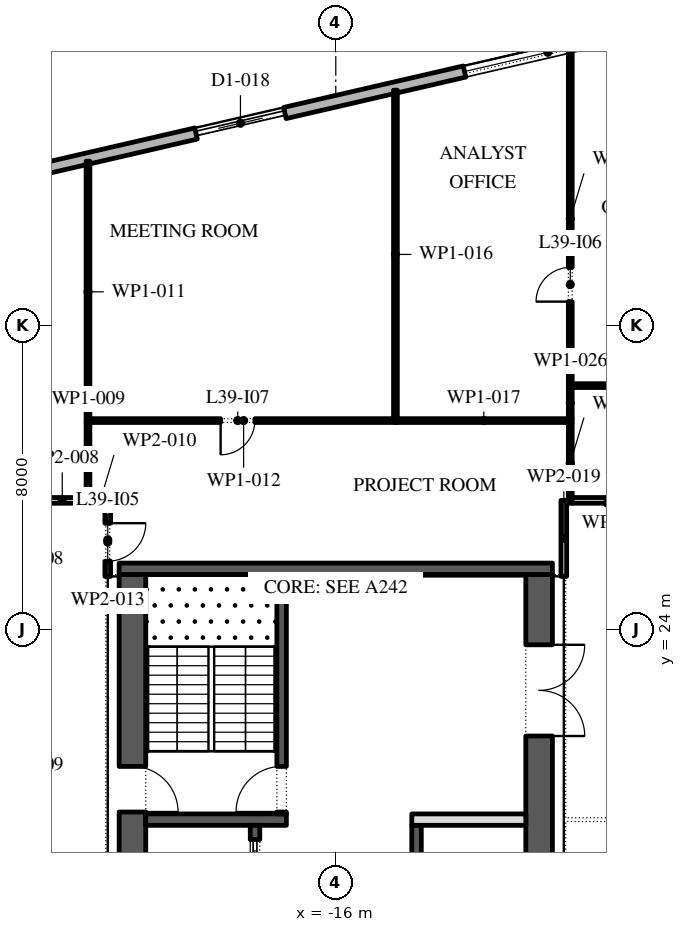
"""IFC4 building model, lengths in metres.
Left out: names, types, materials, properties, quantities, classifications, styles, units other than length and angle.
Written with IfcOpenShell. Run it as: python <this file> out.ifc"""

import sys

from ifc_helpers import new_model, si_unit, direction, frame, frame_2d, origin, place, context, subcontext, project, spatial, rectangle, extrude, element, fill, save


model = new_model("IFC4")
c1 = context("Model", 3, precision=1e-05, world=origin(), true_north=direction((0.0, 1.0)))
c2 = subcontext(c1, "Body", "Model", "MODEL_VIEW")
j1 = project(units=[si_unit("LENGTHUNIT", "METRE"), si_unit("PLANEANGLEUNIT", "RADIAN")], contexts=[c1])
p1 = place(None, origin())
s1 = spatial("IfcSite", under=j1, at=p1, CompositionType="ELEMENT")
p2 = place(p1, origin())
s2 = spatial("IfcBuilding", under=s1, at=p2, CompositionType="ELEMENT")
p3 = place(p2, frame((0.0, 0.0, 180.0)))
s3 = spatial("IfcBuildingStorey", under=s2, at=p3, CompositionType="ELEMENT", Elevation=180.0)
p4 = place(p3, frame((17.592, 45.657, 0.0), z_axis=(0.0, 0.0, 1.0), x_axis=(-0.974370243697, -0.224950279389, 0.0)))
e1 = element("IfcWall", 1, at=p4, inside=s3, PredefinedType="STANDARD", context=c2, shape_type="SweptSolid", body=[
    extrude(rectangle(XDim=49.5, YDim=0.3, at=frame_2d((24.75, 0.0))), origin(), (0.0, 0.0, 1.0), 4.0),
])
p5 = place(p4, frame((2.8, 0.0, 0.0)))
e2 = element("IfcOpeningElement", 2, at=p5, cuts=e1, PredefinedType="OPENING", context=c2, shape_type="SweptSolid", body=[
    extrude(rectangle(XDim=2.4, YDim=3.5, at=frame_2d((1.2, 1.75))), frame((0.0, 0.16, 0.0), z_axis=(0.0, -1.0, 0.0), x_axis=(1.0, 0.0, 0.0)), (0.0, 0.0, 1.0), 0.32),
])
p6 = place(p4, frame((9.9, 0.0, 0.45)))
e3 = element("IfcOpeningElement", 3, at=p6, cuts=e1, PredefinedType="OPENING", context=c2, shape_type="SweptSolid", body=[
    extrude(rectangle(XDim=4.5, YDim=2.45, at=frame_2d((2.25, 1.225))), frame((0.0, 0.16, 0.0), z_axis=(0.0, -1.0, 0.0), x_axis=(1.0, 0.0, 0.0)), (0.0, 0.0, 1.0), 0.32),
])
p7 = place(p4, frame((18.2, 0.0, 0.45)))
e4 = element("IfcOpeningElement", 4, at=p7, cuts=e1, PredefinedType="OPENING", context=c2, shape_type="SweptSolid", body=[
    extrude(rectangle(XDim=4.5, YDim=2.45, at=frame_2d((2.25, 1.225))), frame((0.0, 0.16, 0.0), z_axis=(0.0, -1.0, 0.0), x_axis=(1.0, 0.0, 0.0)), (0.0, 0.0, 1.0), 0.32),
])
p8 = place(p4, frame((26.5, 0.0, 0.45)))
e5 = element("IfcOpeningElement", 5, at=p8, cuts=e1, PredefinedType="OPENING", context=c2, shape_type="SweptSolid", body=[
    extrude(rectangle(XDim=4.5, YDim=2.575, at=frame_2d((2.25, 1.288))), frame((0.0, 0.16, 0.0), z_axis=(0.0, -1.0, 0.0), x_axis=(1.0, 0.0, 0.0)), (0.0, 0.0, 1.0), 0.32),
])
p9 = place(p4, frame((35.85, 0.0, 0.0)))
e6 = element("IfcOpeningElement", 6, at=p9, cuts=e1, PredefinedType="OPENING", context=c2, shape_type="SweptSolid", body=[
    extrude(rectangle(XDim=2.4, YDim=3.5, at=frame_2d((1.2, 1.75))), frame((0.0, 0.16, 0.0), z_axis=(0.0, -1.0, 0.0), x_axis=(1.0, 0.0, 0.0)), (0.0, 0.0, 1.0), 0.32),
])
p10 = place(p4, frame((43.1, 0.0, 0.45)))
e7 = element("IfcOpeningElement", 7, at=p10, cuts=e1, PredefinedType="OPENING", context=c2, shape_type="SweptSolid", body=[
    extrude(rectangle(XDim=4.5, YDim=2.75, at=frame_2d((2.25, 1.375))), frame((0.0, 0.16, 0.0), z_axis=(0.0, -1.0, 0.0), x_axis=(1.0, 0.0, 0.0)), (0.0, 0.0, 1.0), 0.32),
])
p11 = place(p3, frame((-33.157, 30.092, 0.0), z_axis=(0.0, 0.0, 1.0), x_axis=(0.224950279389, -0.974370243697, 0.0)))
e8 = element("IfcWall", 8, at=p11, inside=s3, PredefinedType="STANDARD", context=c2, shape_type="SweptSolid", body=[
    extrude(rectangle(XDim=49.5, YDim=0.3, at=frame_2d((24.75, 0.0))), origin(), (0.0, 0.0, 1.0), 4.0),
])
p12 = place(p11, frame((2.207, 0.0, 0.0)))
e9 = element("IfcOpeningElement", 9, at=p12, cuts=e8, PredefinedType="OPENING", context=c2, shape_type="SweptSolid", body=[
    extrude(rectangle(XDim=2.4, YDim=3.5, at=frame_2d((1.2, 1.75))), frame((0.0, 0.16, 0.0), z_axis=(0.0, -1.0, 0.0), x_axis=(1.0, 0.0, 0.0)), (0.0, 0.0, 1.0), 0.32),
])
p13 = place(p11, frame((8.121, 0.0, 0.45)))
e10 = element("IfcOpeningElement", 10, at=p13, cuts=e8, PredefinedType="OPENING", context=c2, shape_type="SweptSolid", body=[
    extrude(rectangle(XDim=4.5, YDim=2.825, at=frame_2d((2.25, 1.413))), frame((0.0, 0.16, 0.0), z_axis=(0.0, -1.0, 0.0), x_axis=(1.0, 0.0, 0.0)), (0.0, 0.0, 1.0), 0.32),
])
p14 = place(p11, frame((15.236, 0.0, 0.45)))
e11 = element("IfcOpeningElement", 11, at=p14, cuts=e8, PredefinedType="OPENING", context=c2, shape_type="SweptSolid", body=[
    extrude(rectangle(XDim=4.5, YDim=2.95, at=frame_2d((2.25, 1.475))), frame((0.0, 0.16, 0.0), z_axis=(0.0, -1.0, 0.0), x_axis=(1.0, 0.0, 0.0)), (0.0, 0.0, 1.0), 0.32),
])
p15 = place(p11, frame((22.35, 0.0, 0.45)))
e12 = element("IfcOpeningElement", 12, at=p15, cuts=e8, PredefinedType="OPENING", context=c2, shape_type="SweptSolid", body=[
    extrude(rectangle(XDim=4.5, YDim=3.0, at=frame_2d((2.25, 1.5))), frame((0.0, 0.16, 0.0), z_axis=(0.0, -1.0, 0.0), x_axis=(1.0, 0.0, 0.0)), (0.0, 0.0, 1.0), 0.32),
])
p16 = place(p11, frame((30.514, 0.0, 0.0)))
e13 = element("IfcOpeningElement", 13, at=p16, cuts=e8, PredefinedType="OPENING", context=c2, shape_type="SweptSolid", body=[
    extrude(rectangle(XDim=2.4, YDim=3.5, at=frame_2d((1.2, 1.75))), frame((0.0, 0.16, 0.0), z_axis=(0.0, -1.0, 0.0), x_axis=(1.0, 0.0, 0.0)), (0.0, 0.0, 1.0), 0.32),
])
p17 = place(p11, frame((36.579, 0.0, 0.45)))
e14 = element("IfcOpeningElement", 14, at=p17, cuts=e8, PredefinedType="OPENING", context=c2, shape_type="SweptSolid", body=[
    extrude(rectangle(XDim=4.5, YDim=3.05, at=frame_2d((2.25, 1.525))), frame((0.0, 0.16, 0.0), z_axis=(0.0, -1.0, 0.0), x_axis=(1.0, 0.0, 0.0)), (0.0, 0.0, 1.0), 0.32),
])
p18 = place(p11, frame((43.693, 0.0, 0.45)))
e15 = element("IfcOpeningElement", 15, at=p18, cuts=e8, PredefinedType="OPENING", context=c2, shape_type="SweptSolid", body=[
    extrude(rectangle(XDim=4.5, YDim=3.05, at=frame_2d((2.25, 1.525))), frame((0.0, 0.16, 0.0), z_axis=(0.0, -1.0, 0.0), x_axis=(1.0, 0.0, 0.0)), (0.0, 0.0, 1.0), 0.32),
])
p19 = place(p3, frame((-21.35, -2.45, 0.0), z_axis=(0.0, 0.0, 1.0), x_axis=(0.0, 1.0, 0.0)))
e16 = element("IfcWall", 16, at=p19, inside=s3, PredefinedType="SHEAR", context=c2, shape_type="SweptSolid", body=[
    extrude(rectangle(XDim=27.9, YDim=0.7, at=frame_2d((13.95, 0.0))), origin(), (0.0, 0.0, 1.0), 4.0),
])
p20 = place(p19, frame((5.05, 0.0, 0.0)))
e17 = element("IfcOpeningElement", 17, at=p20, cuts=e16, PredefinedType="OPENING", context=c2, shape_type="SweptSolid", body=[
    extrude(rectangle(XDim=1.2, YDim=2.1, at=frame_2d((0.6, 1.05))), frame((0.0, 0.36, 0.0), z_axis=(0.0, -1.0, 0.0), x_axis=(1.0, 0.0, 0.0)), (0.0, 0.0, 1.0), 0.72),
])
p21 = place(p19, frame((21.65, 0.0, 0.0)))
e18 = element("IfcOpeningElement", 18, at=p21, cuts=e16, PredefinedType="OPENING", context=c2, shape_type="SweptSolid", body=[
    extrude(rectangle(XDim=1.2, YDim=2.1, at=frame_2d((0.6, 1.05))), frame((0.0, 0.36, 0.0), z_axis=(0.0, -1.0, 0.0), x_axis=(1.0, 0.0, 0.0)), (0.0, 0.0, 1.0), 0.72),
])
p22 = place(p3, frame((-10.65, -2.45, 0.0), z_axis=(0.0, 0.0, 1.0), x_axis=(0.0, 1.0, 0.0)))
e19 = element("IfcWall", 19, at=p22, inside=s3, PredefinedType="SHEAR", context=c2, shape_type="SweptSolid", body=[
    extrude(rectangle(XDim=27.9, YDim=0.7, at=frame_2d((13.95, 0.0))), origin(), (0.0, 0.0, 1.0), 4.0),
])
p23 = place(p22, frame((23.65, 0.0, 0.0)))
e20 = element("IfcOpeningElement", 20, at=p23, cuts=e19, PredefinedType="OPENING", context=c2, shape_type="SweptSolid", body=[
    extrude(rectangle(XDim=2.4, YDim=2.1, at=frame_2d((1.2, 1.05))), frame((0.0, 0.36, 0.0), z_axis=(0.0, -1.0, 0.0), x_axis=(1.0, 0.0, 0.0)), (0.0, 0.0, 1.0), 0.72),
])
p24 = place(p22, frame((1.087, 0.0, 0.0)))
e21 = element("IfcOpeningElement", 21, at=p24, cuts=e19, PredefinedType="OPENING", context=c2, shape_type="SweptSolid", body=[
    extrude(rectangle(XDim=0.9, YDim=2.1, at=frame_2d((0.45, 1.05))), frame((0.0, 0.36, 0.0), z_axis=(0.0, -1.0, 0.0), x_axis=(1.0, 0.0, 0.0)), (0.0, 0.0, 1.0), 0.72),
])
p25 = place(p22, frame((4.262, 0.0, 0.0)))
e22 = element("IfcOpeningElement", 22, at=p25, cuts=e19, PredefinedType="OPENING", context=c2, shape_type="SweptSolid", body=[
    extrude(rectangle(XDim=1.0, YDim=2.1, at=frame_2d((0.5, 1.05))), frame((0.0, 0.36, 0.0), z_axis=(0.0, -1.0, 0.0), x_axis=(1.0, 0.0, 0.0)), (0.0, 0.0, 1.0), 0.72),
])
p26 = place(p3, frame((-21.7, 25.6, 0.0), z_axis=(0.0, 0.0, 1.0), x_axis=(1.0, 0.0, 0.0)))
e23 = element("IfcWall", 23, at=p26, inside=s3, PredefinedType="SHEAR", context=c2, shape_type="SweptSolid", body=[
    extrude(rectangle(XDim=11.4, YDim=0.3, at=frame_2d((5.7, 0.0))), origin(), (0.0, 0.0, 1.0), 4.0),
])
p27 = place(p3, frame((-21.0, 19.0, 0.0), z_axis=(0.0, 0.0, 1.0), x_axis=(1.0, 0.0, 0.0)))
e24 = element("IfcWall", 24, at=p27, inside=s3, PredefinedType="SHEAR", context=c2, shape_type="SweptSolid", body=[
    extrude(rectangle(XDim=3.7, YDim=0.3, at=frame_2d((1.85, 0.0))), origin(), (0.0, 0.0, 1.0), 4.0),
])
p28 = place(p3, frame((-17.425, 19.15, 0.0), z_axis=(0.0, 0.0, 1.0), x_axis=(0.0, 1.0, 0.0)))
e25 = element("IfcWall", 25, at=p28, inside=s3, PredefinedType="SHEAR", context=c2, shape_type="SweptSolid", body=[
    extrude(rectangle(XDim=6.3, YDim=0.25, at=frame_2d((3.15, 0.0))), origin(), (0.0, 0.0, 1.0), 4.0),
])
p29 = place(p28, frame((0.05, 0.0, 0.0)))
e26 = element("IfcOpeningElement", 26, at=p29, cuts=e25, PredefinedType="OPENING", context=c2, shape_type="SweptSolid", body=[
    extrude(rectangle(XDim=1.2, YDim=2.1, at=frame_2d((0.6, 1.05))), frame((0.0, 0.135, 0.0), z_axis=(0.0, -1.0, 0.0), x_axis=(1.0, 0.0, 0.0)), (0.0, 0.0, 1.0), 0.27),
])
p30 = place(p3, frame((-18.125, 4.15, 0.0), z_axis=(0.0, 0.0, 1.0), x_axis=(0.0, 1.0, 0.0)))
e27 = element("IfcWall", 27, at=p30, inside=s3, PredefinedType="SHEAR", context=c2, shape_type="SweptSolid", body=[
    extrude(rectangle(XDim=14.7, YDim=0.25, at=frame_2d((7.35, 0.0))), origin(), (0.0, 0.0, 1.0), 4.0),
])
p31 = place(p30, frame((6.9, 0.0, 0.0)))
e28 = element("IfcOpeningElement", 28, at=p31, cuts=e27, PredefinedType="OPENING", context=c2, shape_type="SweptSolid", body=[
    extrude(rectangle(XDim=0.9, YDim=2.1, at=frame_2d((0.45, 1.05))), frame((0.0, 0.135, 0.0), z_axis=(0.0, -1.0, 0.0), x_axis=(1.0, 0.0, 0.0)), (0.0, 0.0, 1.0), 0.27),
])
p32 = place(p30, frame((0.371, 0.0, 0.0)))
e29 = element("IfcOpeningElement", 29, at=p32, cuts=e27, PredefinedType="OPENING", context=c2, shape_type="SweptSolid", body=[
    extrude(rectangle(XDim=1.1, YDim=2.1, at=frame_2d((0.55, 1.05))), frame((0.0, 0.135, 0.0), z_axis=(0.0, -1.0, 0.0), x_axis=(1.0, 0.0, 0.0)), (0.0, 0.0, 1.0), 0.27),
])
p33 = place(p30, frame((13.229, 0.0, 0.0)))
e30 = element("IfcOpeningElement", 30, at=p33, cuts=e27, PredefinedType="OPENING", context=c2, shape_type="SweptSolid", body=[
    extrude(rectangle(XDim=1.1, YDim=2.1, at=frame_2d((0.55, 1.05))), frame((0.0, 0.135, 0.0), z_axis=(0.0, -1.0, 0.0), x_axis=(1.0, 0.0, 0.0)), (0.0, 0.0, 1.0), 0.27),
])
p34 = place(p3, frame((-13.875, -2.45, 0.0), z_axis=(0.0, 0.0, 1.0), x_axis=(0.0, 1.0, 0.0)))
e31 = element("IfcWall", 31, at=p34, inside=s3, PredefinedType="SHEAR", context=c2, shape_type="SweptSolid", body=[
    extrude(rectangle(XDim=21.3, YDim=0.25, at=frame_2d((10.65, 0.0))), origin(), (0.0, 0.0, 1.0), 4.0),
])
p35 = place(p34, frame((17.786, 0.0, 0.0)))
e32 = element("IfcOpeningElement", 32, at=p35, cuts=e31, PredefinedType="OPENING", context=c2, shape_type="SweptSolid", body=[
    extrude(rectangle(XDim=0.9, YDim=2.1, at=frame_2d((0.45, 1.05))), frame((0.0, 0.135, 0.0), z_axis=(0.0, -1.0, 0.0), x_axis=(1.0, 0.0, 0.0)), (0.0, 0.0, 1.0), 0.27),
])
p36 = place(p34, frame((6.971, 0.0, 0.0)))
e33 = element("IfcOpeningElement", 33, at=p36, cuts=e31, PredefinedType="OPENING", context=c2, shape_type="SweptSolid", body=[
    extrude(rectangle(XDim=1.1, YDim=2.1, at=frame_2d((0.55, 1.05))), frame((0.0, 0.135, 0.0), z_axis=(0.0, -1.0, 0.0), x_axis=(1.0, 0.0, 0.0)), (0.0, 0.0, 1.0), 0.27),
])
p37 = place(p34, frame((9.114, 0.0, 0.0)))
e34 = element("IfcOpeningElement", 34, at=p37, cuts=e31, PredefinedType="OPENING", context=c2, shape_type="SweptSolid", body=[
    extrude(rectangle(XDim=1.1, YDim=2.1, at=frame_2d((0.55, 1.05))), frame((0.0, 0.135, 0.0), z_axis=(0.0, -1.0, 0.0), x_axis=(1.0, 0.0, 0.0)), (0.0, 0.0, 1.0), 0.27),
])
p38 = place(p34, frame((11.257, 0.0, 0.0)))
e35 = element("IfcOpeningElement", 35, at=p38, cuts=e31, PredefinedType="OPENING", context=c2, shape_type="SweptSolid", body=[
    extrude(rectangle(XDim=1.1, YDim=2.1, at=frame_2d((0.55, 1.05))), frame((0.0, 0.135, 0.0), z_axis=(0.0, -1.0, 0.0), x_axis=(1.0, 0.0, 0.0)), (0.0, 0.0, 1.0), 0.27),
])
p39 = place(p34, frame((13.4, 0.0, 0.0)))
e36 = element("IfcOpeningElement", 36, at=p39, cuts=e31, PredefinedType="OPENING", context=c2, shape_type="SweptSolid", body=[
    extrude(rectangle(XDim=1.1, YDim=2.1, at=frame_2d((0.55, 1.05))), frame((0.0, 0.135, 0.0), z_axis=(0.0, -1.0, 0.0), x_axis=(1.0, 0.0, 0.0)), (0.0, 0.0, 1.0), 0.27),
])
p40 = place(p3, frame((-14.0, 19.0, 0.0), z_axis=(0.0, 0.0, 1.0), x_axis=(1.0, 0.0, 0.0)))
e37 = element("IfcWall", 37, at=p40, inside=s3, PredefinedType="PARTITIONING", context=c2, shape_type="SweptSolid", body=[
    extrude(rectangle(XDim=3.0, YDim=0.3, at=frame_2d((1.5, 0.0))), origin(), (0.0, 0.0, 1.0), 4.0),
])
p41 = place(p3, frame((-23.925, 27.4, 0.0), z_axis=(0.0, 0.0, 1.0), x_axis=(1.0, 0.0, 0.0)))
e38 = element("IfcWall", 38, at=p41, inside=s3, PredefinedType="PARTITIONING", context=c2, shape_type="SweptSolid", body=[
    extrude(rectangle(XDim=1.455, YDim=0.15, at=frame_2d((0.728, 0.0))), origin(), (0.0, 0.0, 1.0), 4.0),
])
p42 = place(p3, frame((-22.52, 27.475, 0.0), z_axis=(0.0, 0.0, 1.0), x_axis=(0.0, 1.0, 0.0)))
e39 = element("IfcWall", 39, at=p42, inside=s3, PredefinedType="PARTITIONING", context=c2, shape_type="SweptSolid", body=[
    extrude(rectangle(XDim=1.975, YDim=0.1, at=frame_2d((0.987, 0.0))), origin(), (0.0, 0.0, 1.0), 4.0),
])
p43 = place(p3, frame((-22.47, 27.4, 0.0), z_axis=(0.0, 0.0, 1.0), x_axis=(1.0, 0.0, 0.0)))
e40 = element("IfcWall", 40, at=p43, inside=s3, PredefinedType="PARTITIONING", context=c2, shape_type="SweptSolid", body=[
    extrude(rectangle(XDim=0.545, YDim=0.15, at=frame_2d((0.272, 0.0))), origin(), (0.0, 0.0, 1.0), 4.0),
])
p44 = place(p3, frame((-22.52, 29.45, 0.0), z_axis=(0.0, 0.0, 1.0), x_axis=(0.0, 1.0, 0.0)))
e41 = element("IfcWall", 41, at=p44, inside=s3, PredefinedType="PARTITIONING", context=c2, shape_type="SweptSolid", body=[
    extrude(rectangle(XDim=6.875, YDim=0.1, at=frame_2d((3.438, 0.0))), origin(), (0.0, 0.0, 1.0), 4.0),
])
p45 = place(p3, frame((-22.47, 29.5, 0.0), z_axis=(0.0, 0.0, 1.0), x_axis=(1.0, 0.0, 0.0)))
e42 = element("IfcWall", 42, at=p45, inside=s3, PredefinedType="PARTITIONING", context=c2, shape_type="SweptSolid", body=[
    extrude(rectangle(XDim=8.09, YDim=0.1, at=frame_2d((4.045, 0.0))), origin(), (0.0, 0.0, 1.0), 4.0),
])
p46 = place(p45, frame((3.44, 0.0, 0.0)))
e43 = element("IfcOpeningElement", 43, at=p46, cuts=e42, PredefinedType="OPENING", context=c2, shape_type="SweptSolid", body=[
    extrude(rectangle(XDim=0.9, YDim=2.1, at=frame_2d((0.45, 1.05))), frame((0.0, 0.06, 0.0), z_axis=(0.0, -1.0, 0.0), x_axis=(1.0, 0.0, 0.0)), (0.0, 0.0, 1.0), 0.12),
])
p47 = place(p3, frame((-22.0, 27.325, 0.0), z_axis=(0.0, 0.0, 1.0), x_axis=(0.0, -1.0, 0.0)))
e44 = element("IfcWall", 44, at=p47, inside=s3, PredefinedType="PARTITIONING", context=c2, shape_type="SweptSolid", body=[
    extrude(rectangle(XDim=1.925, YDim=0.15, at=frame_2d((0.962, 0.0))), origin(), (0.0, 0.0, 1.0), 4.0),
])
p48 = place(p47, frame((0.525, 0.0, 0.0)))
e45 = element("IfcOpeningElement", 45, at=p48, cuts=e44, PredefinedType="OPENING", context=c2, shape_type="SweptSolid", body=[
    extrude(rectangle(XDim=1.0, YDim=2.1, at=frame_2d((0.5, 1.05))), frame((0.0, 0.085, 0.0), z_axis=(0.0, -1.0, 0.0), x_axis=(1.0, 0.0, 0.0)), (0.0, 0.0, 1.0), 0.17),
])
p49 = place(p3, frame((-14.43, 29.55, 0.0), z_axis=(0.0, 0.0, 1.0), x_axis=(0.0, 1.0, 0.0)))
e46 = element("IfcWall", 46, at=p49, inside=s3, PredefinedType="PARTITIONING", context=c2, shape_type="SweptSolid", body=[
    extrude(rectangle(XDim=8.643, YDim=0.1, at=frame_2d((4.322, 0.0))), origin(), (0.0, 0.0, 1.0), 4.0),
])
p50 = place(p3, frame((-14.43, 29.5, 0.0), z_axis=(0.0, 0.0, 1.0), x_axis=(1.0, 0.0, 0.0)))
e47 = element("IfcWall", 47, at=p50, inside=s3, PredefinedType="PARTITIONING", context=c2, shape_type="SweptSolid", body=[
    extrude(rectangle(XDim=4.65, YDim=0.1, at=frame_2d((2.325, 0.0))), origin(), (0.0, 0.0, 1.0), 4.0),
])
p51 = place(p3, frame((-10.0, 25.4, 0.0), z_axis=(0.0, 0.0, 1.0), x_axis=(0.0, 1.0, 0.0)))
e48 = element("IfcWall", 48, at=p51, inside=s3, PredefinedType="PARTITIONING", context=c2, shape_type="SweptSolid", body=[
    extrude(rectangle(XDim=2.0, YDim=0.15, at=frame_2d((1.0, 0.0))), origin(), (0.0, 0.0, 1.0), 4.0),
])
p52 = place(p3, frame((-9.83, 27.325, 0.0), z_axis=(0.0, 0.0, 1.0), x_axis=(0.0, 1.0, 0.0)))
e49 = element("IfcWall", 49, at=p52, inside=s3, PredefinedType="PARTITIONING", context=c2, shape_type="SweptSolid", body=[
    extrude(rectangle(XDim=2.125, YDim=0.1, at=frame_2d((1.062, 0.0))), origin(), (0.0, 0.0, 1.0), 4.0),
])
p53 = place(p3, frame((-9.78, 27.4, 0.0), z_axis=(0.0, 0.0, 1.0), x_axis=(1.0, 0.0, 0.0)))
e50 = element("IfcWall", 50, at=p53, inside=s3, PredefinedType="PARTITIONING", context=c2, shape_type="SweptSolid", body=[
    extrude(rectangle(XDim=1.855, YDim=0.15, at=frame_2d((0.927, 0.0))), origin(), (0.0, 0.0, 1.0), 4.0),
])
p54 = place(p3, frame((-9.83, 29.55, 0.0), z_axis=(0.0, 0.0, 1.0), x_axis=(0.0, 1.0, 0.0)))
e51 = element("IfcWall", 51, at=p54, inside=s3, PredefinedType="PARTITIONING", context=c2, shape_type="SweptSolid", body=[
    extrude(rectangle(XDim=0.82, YDim=0.1, at=frame_2d((0.41, 0.0))), origin(), (0.0, 0.0, 1.0), 4.0),
])
p55 = place(p3, frame((-9.83, 30.37, 0.0), z_axis=(0.0, 0.0, 1.0), x_axis=(0.0, 1.0, 0.0)))
e52 = element("IfcWall", 52, at=p55, inside=s3, PredefinedType="PARTITIONING", context=c2, shape_type="SweptSolid", body=[
    extrude(rectangle(XDim=8.885, YDim=0.1, at=frame_2d((4.442, 0.0))), origin(), (0.0, 0.0, 1.0), 4.0),
])
p56 = place(p55, frame((2.26, 0.0, 0.0)))
e53 = element("IfcOpeningElement", 53, at=p56, cuts=e52, PredefinedType="OPENING", context=c2, shape_type="SweptSolid", body=[
    extrude(rectangle(XDim=0.9, YDim=2.1, at=frame_2d((0.45, 1.05))), frame((0.0, 0.06, 0.0), z_axis=(0.0, -1.0, 0.0), x_axis=(1.0, 0.0, 0.0)), (0.0, 0.0, 1.0), 0.12),
])
p57 = place(p3, frame((-9.78, 30.42, 0.0), z_axis=(0.0, 0.0, 1.0), x_axis=(1.0, 0.0, 0.0)))
e54 = element("IfcWall", 54, at=p57, inside=s3, PredefinedType="PARTITIONING", context=c2, shape_type="SweptSolid", body=[
    extrude(rectangle(XDim=8.755, YDim=0.1, at=frame_2d((4.377, 0.0))), origin(), (0.0, 0.0, 1.0), 4.0),
])
p58 = place(p8, origin())
e55 = element("IfcWindow", 55, at=p58, inside=s3, PartitioningType="DOUBLE_PANEL_VERTICAL", PredefinedType="WINDOW", context=c2, shape_type="SweptSolid", body=[
    extrude(rectangle(XDim=4.5, YDim=2.575, at=frame_2d((2.25, 1.288))), frame((0.0, 0.03, 0.0), z_axis=(0.0, -1.0, 0.0), x_axis=(1.0, 0.0, 0.0)), (0.0, 0.0, 1.0), 0.06),
])
fill(e5, e55)
p59 = place(p9, origin())
e56 = element("IfcDoor", 56, at=p59, inside=s3, OperationType="DOUBLE_DOOR_SLIDING", PredefinedType="DOOR", context=c2, shape_type="SweptSolid", body=[
    extrude(rectangle(XDim=2.4, YDim=3.5, at=frame_2d((1.2, 1.75))), frame((0.0, 0.025, 0.0), z_axis=(0.0, -1.0, 0.0), x_axis=(1.0, 0.0, 0.0)), (0.0, 0.0, 1.0), 0.05),
])
fill(e6, e56)
p60 = place(p33, origin())
e57 = element("IfcDoor", 57, at=p60, inside=s3, OperationType="SLIDING_TO_LEFT", PredefinedType="DOOR", context=c2, shape_type="SweptSolid", body=[
    extrude(rectangle(XDim=1.1, YDim=2.1, at=frame_2d((0.55, 1.05))), frame((0.0, 0.025, 0.0), z_axis=(0.0, -1.0, 0.0), x_axis=(1.0, 0.0, 0.0)), (0.0, 0.0, 1.0), 0.05),
])
fill(e30, e57)
p61 = place(p23, frame((2.4, 0.0, 0.0), z_axis=(0.0, 0.0, 1.0), x_axis=(-1.0, 0.0, 0.0)))
e58 = element("IfcDoor", 58, at=p61, inside=s3, OperationType="DOUBLE_DOOR_SINGLE_SWING", PredefinedType="DOOR", context=c2, shape_type="SweptSolid", body=[
    extrude(rectangle(XDim=2.4, YDim=2.1, at=frame_2d((1.2, 1.05))), frame((0.0, 0.025, 0.0), z_axis=(0.0, -1.0, 0.0), x_axis=(1.0, 0.0, 0.0)), (0.0, 0.0, 1.0), 0.05),
])
fill(e20, e58)
p62 = place(p29, origin())
e59 = element("IfcDoor", 59, at=p62, inside=s3, OperationType="SINGLE_SWING_RIGHT", PredefinedType="DOOR", context=c2, shape_type="SweptSolid", body=[
    extrude(rectangle(XDim=1.2, YDim=2.1, at=frame_2d((0.6, 1.05))), frame((0.0, 0.025, 0.0), z_axis=(0.0, -1.0, 0.0), x_axis=(1.0, 0.0, 0.0)), (0.0, 0.0, 1.0), 0.05),
])
fill(e26, e59)
p63 = place(p21, frame((1.2, 0.0, 0.0), z_axis=(0.0, 0.0, 1.0), x_axis=(-1.0, 0.0, 0.0)))
e60 = element("IfcDoor", 60, at=p63, inside=s3, OperationType="SINGLE_SWING_LEFT", PredefinedType="DOOR", context=c2, shape_type="SweptSolid", body=[
    extrude(rectangle(XDim=1.2, YDim=2.1, at=frame_2d((0.6, 1.05))), frame((0.0, 0.025, 0.0), z_axis=(0.0, -1.0, 0.0), x_axis=(1.0, 0.0, 0.0)), (0.0, 0.0, 1.0), 0.05),
])
fill(e18, e60)
p64 = place(p48, origin())
e61 = element("IfcDoor", 61, at=p64, inside=s3, OperationType="SINGLE_SWING_RIGHT", PredefinedType="DOOR", context=c2, shape_type="SweptSolid", body=[
    extrude(rectangle(XDim=1.0, YDim=2.1, at=frame_2d((0.5, 1.05))), frame((0.0, 0.025, 0.0), z_axis=(0.0, -1.0, 0.0), x_axis=(1.0, 0.0, 0.0)), (0.0, 0.0, 1.0), 0.05),
])
fill(e45, e61)
p65 = place(p56, origin())
e62 = element("IfcDoor", 62, at=p65, inside=s3, OperationType="SINGLE_SWING_RIGHT", PredefinedType="DOOR", context=c2, shape_type="SweptSolid", body=[
    extrude(rectangle(XDim=0.9, YDim=2.1, at=frame_2d((0.45, 1.05))), frame((0.0, 0.025, 0.0), z_axis=(0.0, -1.0, 0.0), x_axis=(1.0, 0.0, 0.0)), (0.0, 0.0, 1.0), 0.05),
])
fill(e53, e62)
p66 = place(p46, frame((0.9, 0.0, 0.0), z_axis=(0.0, 0.0, 1.0), x_axis=(-1.0, 0.0, 0.0)))
e63 = element("IfcDoor", 63, at=p66, inside=s3, OperationType="SINGLE_SWING_LEFT", PredefinedType="DOOR", context=c2, shape_type="SweptSolid", body=[
    extrude(rectangle(XDim=0.9, YDim=2.1, at=frame_2d((0.45, 1.05))), frame((0.0, 0.025, 0.0), z_axis=(0.0, -1.0, 0.0), x_axis=(1.0, 0.0, 0.0)), (0.0, 0.0, 1.0), 0.05),
])
fill(e43, e63)
save(model, sys.argv[1])
